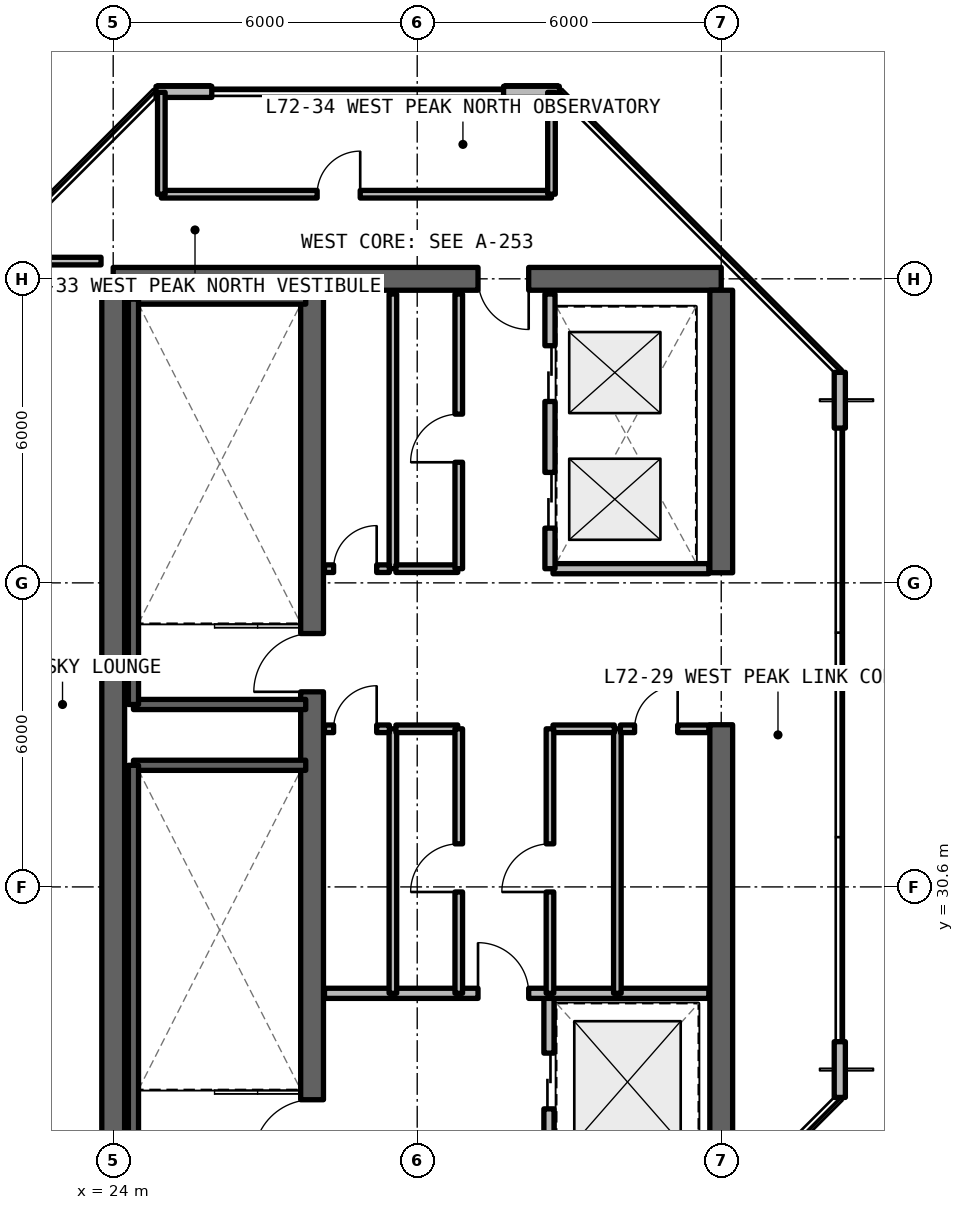
"""IFC4 building model, lengths in metres.
Left out: names, types, materials, properties, quantities, classifications, styles, units other than length and angle.
Written with IfcOpenShell. Run it as: python <this file> out.ifc"""

import sys

from ifc_helpers import new_model, si_unit, direction, frame, frame_2d, origin, place, context, subcontext, project, spatial, rectangle, extrude, element, fill, save


model = new_model("IFC4")
c1 = context("Model", 3, precision=1e-05, world=origin(), true_north=direction((0.0, 1.0)))
c2 = subcontext(c1, "Body", "Model", "MODEL_VIEW")
j1 = project(units=[si_unit("LENGTHUNIT", "METRE"), si_unit("PLANEANGLEUNIT", "RADIAN")], contexts=[c1])
p1 = place(None, origin())
s1 = spatial("IfcSite", under=j1, at=p1, CompositionType="ELEMENT")
p2 = place(p1, origin())
s2 = spatial("IfcBuilding", under=s1, at=p2, CompositionType="ELEMENT")
p3 = place(p2, frame((0.0, 0.0, 257.07)))
s3 = spatial("IfcBuildingStorey", under=s2, at=p3, CompositionType="ELEMENT", Elevation=257.07)
p4 = place(p3, frame((36.0, 42.6, 0.0), z_axis=(0.0, 0.0, 1.0), x_axis=(-1.0, 0.0, 0.0)))
e1 = element("IfcWall", 1, at=p4, inside=s3, PredefinedType="SHEAR", context=c2, shape_type="SweptSolid", body=[
    extrude(rectangle(XDim=12.0, YDim=0.45, at=frame_2d((6.0, 0.0))), origin(), (0.0, 0.0, 1.0), 3.37),
])
p5 = place(p4, frame((3.8, 0.0, 0.0)))
e2 = element("IfcOpeningElement", 2, at=p5, cuts=e1, PredefinedType="OPENING", context=c2, shape_type="SweptSolid", body=[
    extrude(rectangle(XDim=1.0, YDim=2.15, at=frame_2d((0.5, 1.075))), frame((0.0, 0.235, 0.0), z_axis=(0.0, -1.0, 0.0), x_axis=(1.0, 0.0, 0.0)), (0.0, 0.0, 1.0), 0.47),
])
p6 = place(p3, frame((24.0, 24.825, 0.0), z_axis=(0.0, 0.0, 1.0), x_axis=(0.0, 1.0, 0.0)))
e3 = element("IfcWall", 3, at=p6, inside=s3, PredefinedType="SHEAR", context=c2, shape_type="SweptSolid", body=[
    extrude(rectangle(XDim=17.55, YDim=0.45, at=frame_2d((8.775, 0.0))), origin(), (0.0, 0.0, 1.0), 3.37),
])
p7 = place(p3, frame((36.0, 24.825, 0.0), z_axis=(0.0, 0.0, 1.0), x_axis=(0.0, 1.0, 0.0)))
e4 = element("IfcWall", 4, at=p7, inside=s3, PredefinedType="SHEAR", context=c2, shape_type="SweptSolid", body=[
    extrude(rectangle(XDim=8.975, YDim=0.45, at=frame_2d((4.488, 0.0))), origin(), (0.0, 0.0, 1.0), 3.37),
])
p8 = place(p3, frame((36.0, 36.8, 0.0), z_axis=(0.0, 0.0, 1.0), x_axis=(0.0, 1.0, 0.0)))
e5 = element("IfcWall", 5, at=p8, inside=s3, PredefinedType="SHEAR", context=c2, shape_type="SweptSolid", body=[
    extrude(rectangle(XDim=5.575, YDim=0.45, at=frame_2d((2.788, 0.0))), origin(), (0.0, 0.0, 1.0), 3.37),
])
p9 = place(p3, frame((27.925, 24.825, 0.0), z_axis=(0.0, 0.0, 1.0), x_axis=(0.0, 1.0, 0.0)))
e6 = element("IfcWall", 6, at=p9, inside=s3, PredefinedType="SHEAR", context=c2, shape_type="SweptSolid", body=[
    extrude(rectangle(XDim=17.55, YDim=0.45, at=frame_2d((8.775, 0.0))), origin(), (0.0, 0.0, 1.0), 3.37),
])
p10 = place(p9, frame((0.425, 0.0, 0.0)))
e7 = element("IfcOpeningElement", 7, at=p10, cuts=e6, PredefinedType="OPENING", context=c2, shape_type="SweptSolid", body=[
    extrude(rectangle(XDim=1.15, YDim=2.15, at=frame_2d((0.575, 1.075))), frame((0.0, 0.235, 0.0), z_axis=(0.0, -1.0, 0.0), x_axis=(1.0, 0.0, 0.0)), (0.0, 0.0, 1.0), 0.47),
])
p11 = place(p9, frame((9.625, 0.0, 0.0)))
e8 = element("IfcOpeningElement", 8, at=p11, cuts=e6, PredefinedType="OPENING", context=c2, shape_type="SweptSolid", body=[
    extrude(rectangle(XDim=1.15, YDim=2.15, at=frame_2d((0.575, 1.075))), frame((0.0, 0.235, 0.0), z_axis=(0.0, -1.0, 0.0), x_axis=(1.0, 0.0, 0.0)), (0.0, 0.0, 1.0), 0.47),
])
for number, where, z_axis, x_axis in (
    (9, (38.34, 26.446, 0.0), (0.0, 0.0, 1.0), (0.0, 1.0, 0.0)),
    (10, (38.34, 39.654, 0.0), (0.0, 0.0, 1.0), (0.0, 1.0, 0.0)),
    (11, (32.804, 46.29, 0.0), (0.0, 0.0, 1.0), (-1.0, 0.0, 0.0)),
):
    element("IfcWall", number, at=place(p3, frame(where, z_axis=z_axis, x_axis=x_axis)), inside=s3, PredefinedType="SOLIDWALL", context=c2, shape_type="SweptSolid", body=[
        extrude(rectangle(XDim=1.1, YDim=0.22, at=frame_2d((0.55, 0.0))), origin(), (0.0, 0.0, 1.0), 3.41),
    ])
p12 = place(p3, frame((25.946, 46.29, 0.0), z_axis=(0.0, 0.0, 1.0), x_axis=(-1.0, 0.0, 0.0)))
e12 = element("IfcWall", 12, at=p12, inside=s3, PredefinedType="SOLIDWALL", context=c2, shape_type="SweptSolid", body=[
    extrude(rectangle(XDim=1.1, YDim=0.22, at=frame_2d((0.55, 0.0))), origin(), (0.0, 0.0, 1.0), 3.41),
])
p13 = place(p3, frame((32.6, 24.92, 0.0), z_axis=(0.0, 0.0, 1.0), x_axis=(0.0, 1.0, 0.0)))
e13 = element("IfcWall", 13, at=p13, inside=s3, PredefinedType="SOLIDWALL", context=c2, shape_type="SweptSolid", body=[
    extrude(rectangle(XDim=3.58, YDim=0.2, at=frame_2d((1.79, 0.0))), origin(), (0.0, 0.0, 1.0), 2.63),
])
p14 = place(p13, frame((1.3, 0.0, 0.0)))
e14 = element("IfcOpeningElement", 14, at=p14, cuts=e13, PredefinedType="OPENING", context=c2, shape_type="SweptSolid", body=[
    extrude(rectangle(XDim=1.1, YDim=2.2, at=frame_2d((0.55, 1.1))), frame((0.0, 0.11, 0.0), z_axis=(0.0, -1.0, 0.0), x_axis=(1.0, 0.0, 0.0)), (0.0, 0.0, 1.0), 0.22),
])
p15 = place(p3, frame((28.17, 28.5, 0.0), z_axis=(0.0, 0.0, 1.0), x_axis=(1.0, 0.0, 0.0)))
e15 = element("IfcWall", 15, at=p15, inside=s3, PredefinedType="SOLIDWALL", context=c2, shape_type="SweptSolid", body=[
    extrude(rectangle(XDim=7.585, YDim=0.2, at=frame_2d((3.792, 0.0))), origin(), (0.0, 0.0, 1.0), 2.63),
])
p16 = place(p15, frame((3.03, 0.0, 0.0)))
e16 = element("IfcOpeningElement", 16, at=p16, cuts=e15, PredefinedType="OPENING", context=c2, shape_type="SweptSolid", body=[
    extrude(rectangle(XDim=1.0, YDim=2.15, at=frame_2d((0.5, 1.075))), frame((0.0, 0.11, 0.0), z_axis=(0.0, -1.0, 0.0), x_axis=(1.0, 0.0, 0.0)), (0.0, 0.0, 1.0), 0.22),
])
p17 = place(p3, frame((29.52, 28.5, 0.0), z_axis=(0.0, 0.0, 1.0), x_axis=(0.0, 1.0, 0.0)))
e17 = element("IfcWall", 17, at=p17, inside=s3, PredefinedType="SOLIDWALL", context=c2, shape_type="SweptSolid", body=[
    extrude(rectangle(XDim=5.22, YDim=0.15, at=frame_2d((2.61, 0.0))), origin(), (0.0, 0.0, 1.0), 2.63),
])
p18 = place(p3, frame((28.17, 33.72, 0.0), z_axis=(0.0, 0.0, 1.0), x_axis=(1.0, 0.0, 0.0)))
e18 = element("IfcWall", 18, at=p18, inside=s3, PredefinedType="SOLIDWALL", context=c2, shape_type="SweptSolid", body=[
    extrude(rectangle(XDim=1.28, YDim=0.15, at=frame_2d((0.64, 0.0))), origin(), (0.0, 0.0, 1.0), 2.63),
])
p19 = place(p18, frame((0.18, 0.0, 0.0)))
e19 = element("IfcOpeningElement", 19, at=p19, cuts=e18, PredefinedType="OPENING", context=c2, shape_type="SweptSolid", body=[
    extrude(rectangle(XDim=0.85, YDim=2.1, at=frame_2d((0.425, 1.05))), frame((0.0, 0.085, 0.0), z_axis=(0.0, -1.0, 0.0), x_axis=(1.0, 0.0, 0.0)), (0.0, 0.0, 1.0), 0.17),
])
p20 = place(p3, frame((29.58, 33.72, 0.0), z_axis=(0.0, 0.0, 1.0), x_axis=(1.0, 0.0, 0.0)))
e20 = element("IfcWall", 20, at=p20, inside=s3, PredefinedType="SOLIDWALL", context=c2, shape_type="SweptSolid", body=[
    extrude(rectangle(XDim=1.22, YDim=0.15, at=frame_2d((0.61, 0.0))), origin(), (0.0, 0.0, 1.0), 2.63),
])
p21 = place(p3, frame((30.82, 28.5, 0.0), z_axis=(0.0, 0.0, 1.0), x_axis=(0.0, 1.0, 0.0)))
e21 = element("IfcWall", 21, at=p21, inside=s3, PredefinedType="SOLIDWALL", context=c2, shape_type="SweptSolid", body=[
    extrude(rectangle(XDim=5.22, YDim=0.15, at=frame_2d((2.61, 0.0))), origin(), (0.0, 0.0, 1.0), 2.63),
])
p22 = place(p21, frame((2.0, 0.0, 0.0)))
e22 = element("IfcOpeningElement", 22, at=p22, cuts=e21, PredefinedType="OPENING", context=c2, shape_type="SweptSolid", body=[
    extrude(rectangle(XDim=0.95, YDim=2.15, at=frame_2d((0.475, 1.075))), frame((0.0, 0.085, 0.0), z_axis=(0.0, -1.0, 0.0), x_axis=(1.0, 0.0, 0.0)), (0.0, 0.0, 1.0), 0.17),
])
p23 = place(p3, frame((33.95, 28.5, 0.0), z_axis=(0.0, 0.0, 1.0), x_axis=(0.0, 1.0, 0.0)))
e23 = element("IfcWall", 23, at=p23, inside=s3, PredefinedType="SOLIDWALL", context=c2, shape_type="SweptSolid", body=[
    extrude(rectangle(XDim=5.22, YDim=0.15, at=frame_2d((2.61, 0.0))), origin(), (0.0, 0.0, 1.0), 2.63),
])
p24 = place(p3, frame((32.68, 33.72, 0.0), z_axis=(0.0, 0.0, 1.0), x_axis=(1.0, 0.0, 0.0)))
e24 = element("IfcWall", 24, at=p24, inside=s3, PredefinedType="SOLIDWALL", context=c2, shape_type="SweptSolid", body=[
    extrude(rectangle(XDim=1.21, YDim=0.15, at=frame_2d((0.605, 0.0))), origin(), (0.0, 0.0, 1.0), 2.63),
])
p25 = place(p3, frame((34.01, 33.72, 0.0), z_axis=(0.0, 0.0, 1.0), x_axis=(1.0, 0.0, 0.0)))
e25 = element("IfcWall", 25, at=p25, inside=s3, PredefinedType="SOLIDWALL", context=c2, shape_type="SweptSolid", body=[
    extrude(rectangle(XDim=1.745, YDim=0.15, at=frame_2d((0.873, 0.0))), origin(), (0.0, 0.0, 1.0), 2.63),
])
p26 = place(p25, frame((0.28, 0.0, 0.0)))
e26 = element("IfcOpeningElement", 26, at=p26, cuts=e25, PredefinedType="OPENING", context=c2, shape_type="SweptSolid", body=[
    extrude(rectangle(XDim=0.85, YDim=2.1, at=frame_2d((0.425, 1.05))), frame((0.0, 0.085, 0.0), z_axis=(0.0, -1.0, 0.0), x_axis=(1.0, 0.0, 0.0)), (0.0, 0.0, 1.0), 0.17),
])
p27 = place(p3, frame((32.62, 28.5, 0.0), z_axis=(0.0, 0.0, 1.0), x_axis=(0.0, 1.0, 0.0)))
e27 = element("IfcWall", 27, at=p27, inside=s3, PredefinedType="SOLIDWALL", context=c2, shape_type="SweptSolid", body=[
    extrude(rectangle(XDim=5.22, YDim=0.15, at=frame_2d((2.61, 0.0))), origin(), (0.0, 0.0, 1.0), 2.63),
])
p28 = place(p27, frame((2.0, 0.0, 0.0)))
e28 = element("IfcOpeningElement", 28, at=p28, cuts=e27, PredefinedType="OPENING", context=c2, shape_type="SweptSolid", body=[
    extrude(rectangle(XDim=0.95, YDim=2.15, at=frame_2d((0.475, 1.075))), frame((0.0, 0.085, 0.0), z_axis=(0.0, -1.0, 0.0), x_axis=(1.0, 0.0, 0.0)), (0.0, 0.0, 1.0), 0.17),
])
p29 = place(p3, frame((29.52, 36.88, 0.0), z_axis=(0.0, 0.0, 1.0), x_axis=(0.0, 1.0, 0.0)))
e29 = element("IfcWall", 29, at=p29, inside=s3, PredefinedType="SOLIDWALL", context=c2, shape_type="SweptSolid", body=[
    extrude(rectangle(XDim=5.42, YDim=0.15, at=frame_2d((2.71, 0.0))), origin(), (0.0, 0.0, 1.0), 2.63),
])
p30 = place(p3, frame((28.17, 36.88, 0.0), z_axis=(0.0, 0.0, 1.0), x_axis=(1.0, 0.0, 0.0)))
e30 = element("IfcWall", 30, at=p30, inside=s3, PredefinedType="SOLIDWALL", context=c2, shape_type="SweptSolid", body=[
    extrude(rectangle(XDim=1.28, YDim=0.15, at=frame_2d((0.64, 0.0))), origin(), (0.0, 0.0, 1.0), 2.63),
])
p31 = place(p30, frame((0.18, 0.0, 0.0)))
e31 = element("IfcOpeningElement", 31, at=p31, cuts=e30, PredefinedType="OPENING", context=c2, shape_type="SweptSolid", body=[
    extrude(rectangle(XDim=0.85, YDim=2.1, at=frame_2d((0.425, 1.05))), frame((0.0, 0.085, 0.0), z_axis=(0.0, -1.0, 0.0), x_axis=(1.0, 0.0, 0.0)), (0.0, 0.0, 1.0), 0.17),
])
p32 = place(p3, frame((29.58, 36.88, 0.0), z_axis=(0.0, 0.0, 1.0), x_axis=(1.0, 0.0, 0.0)))
e32 = element("IfcWall", 32, at=p32, inside=s3, PredefinedType="SOLIDWALL", context=c2, shape_type="SweptSolid", body=[
    extrude(rectangle(XDim=1.22, YDim=0.15, at=frame_2d((0.61, 0.0))), origin(), (0.0, 0.0, 1.0), 2.63),
])
p33 = place(p3, frame((30.82, 36.88, 0.0), z_axis=(0.0, 0.0, 1.0), x_axis=(0.0, 1.0, 0.0)))
e33 = element("IfcWall", 33, at=p33, inside=s3, PredefinedType="SOLIDWALL", context=c2, shape_type="SweptSolid", body=[
    extrude(rectangle(XDim=5.42, YDim=0.15, at=frame_2d((2.71, 0.0))), origin(), (0.0, 0.0, 1.0), 2.63),
])
p34 = place(p33, frame((2.1, 0.0, 0.0)))
e34 = element("IfcOpeningElement", 34, at=p34, cuts=e33, PredefinedType="OPENING", context=c2, shape_type="SweptSolid", body=[
    extrude(rectangle(XDim=0.95, YDim=2.15, at=frame_2d((0.475, 1.075))), frame((0.0, 0.085, 0.0), z_axis=(0.0, -1.0, 0.0), x_axis=(1.0, 0.0, 0.0)), (0.0, 0.0, 1.0), 0.17),
])
p35 = place(p3, frame((32.68, 36.88, 0.0), z_axis=(0.0, 0.0, 1.0), x_axis=(1.0, 0.0, 0.0)))
e35 = element("IfcWall", 35, at=p35, inside=s3, PredefinedType="SOLIDWALL", context=c2, shape_type="SweptSolid", body=[
    extrude(rectangle(XDim=3.075, YDim=0.2, at=frame_2d((1.538, 0.0))), origin(), (0.0, 0.0, 1.0), 2.63),
])
p36 = place(p3, frame((32.62, 36.88, 0.0), z_axis=(0.0, 0.0, 1.0), x_axis=(0.0, 1.0, 0.0)))
e36 = element("IfcWall", 36, at=p36, inside=s3, PredefinedType="SOLIDWALL", context=c2, shape_type="SweptSolid", body=[
    extrude(rectangle(XDim=5.42, YDim=0.2, at=frame_2d((2.71, 0.0))), origin(), (0.0, 0.0, 1.0), 2.63),
])
p37 = place(p36, frame((0.8, 0.0, 0.0)))
e37 = element("IfcOpeningElement", 37, at=p37, cuts=e36, PredefinedType="OPENING", context=c2, shape_type="SweptSolid", body=[
    extrude(rectangle(XDim=1.1, YDim=2.2, at=frame_2d((0.55, 1.1))), frame((0.0, 0.11, 0.0), z_axis=(0.0, -1.0, 0.0), x_axis=(1.0, 0.0, 0.0)), (0.0, 0.0, 1.0), 0.22),
])
p38 = place(p36, frame((3.3, 0.0, 0.0)))
e38 = element("IfcOpeningElement", 38, at=p38, cuts=e36, PredefinedType="OPENING", context=c2, shape_type="SweptSolid", body=[
    extrude(rectangle(XDim=1.1, YDim=2.2, at=frame_2d((0.55, 1.1))), frame((0.0, 0.11, 0.0), z_axis=(0.0, -1.0, 0.0), x_axis=(1.0, 0.0, 0.0)), (0.0, 0.0, 1.0), 0.22),
])
p39 = place(p3, frame((22.12, 42.95, 0.0), z_axis=(0.0, 0.0, 1.0), x_axis=(1.0, 0.0, 0.0)))
e39 = element("IfcWall", 39, at=p39, inside=s3, PredefinedType="SOLIDWALL", context=c2, shape_type="SweptSolid", body=[
    extrude(rectangle(XDim=1.64, YDim=0.15, at=frame_2d((0.82, 0.0))), origin(), (0.0, 0.0, 1.0), 2.63),
])
p40 = place(p3, frame((24.95, 44.27, 0.0), z_axis=(0.0, 0.0, 1.0), x_axis=(1.0, 0.0, 0.0)))
e40 = element("IfcWall", 40, at=p40, inside=s3, PredefinedType="SOLIDWALL", context=c2, shape_type="SweptSolid", body=[
    extrude(rectangle(XDim=7.7, YDim=0.15, at=frame_2d((3.85, 0.0))), origin(), (0.0, 0.0, 1.0), 2.63),
])
p41 = place(p40, frame((3.075, 0.0, 0.0)))
e41 = element("IfcOpeningElement", 41, at=p41, cuts=e40, PredefinedType="OPENING", context=c2, shape_type="SweptSolid", body=[
    extrude(rectangle(XDim=0.85, YDim=2.1, at=frame_2d((0.425, 1.05))), frame((0.0, 0.085, 0.0), z_axis=(0.0, -1.0, 0.0), x_axis=(1.0, 0.0, 0.0)), (0.0, 0.0, 1.0), 0.17),
])
for number, where, z_axis, x_axis in (
    (42, (24.95, 44.27, 0.0), (0.0, 0.0, 1.0), (0.0, 1.0, 0.0)),
    (43, (32.65, 44.27, 0.0), (0.0, 0.0, 1.0), (0.0, 1.0, 0.0)),
):
    element("IfcWall", number, at=place(p3, frame(where, z_axis=z_axis, x_axis=x_axis)), inside=s3, PredefinedType="SOLIDWALL", context=c2, shape_type="SweptSolid", body=[
        extrude(rectangle(XDim=2.01, YDim=0.15, at=frame_2d((1.005, 0.0))), origin(), (0.0, 0.0, 1.0), 2.63),
    ])
p42 = place(p3, frame((27.8, 33.0, 0.0), z_axis=(0.0, 0.0, 1.0), x_axis=(-1.0, 0.0, 0.0)))
e44 = element("IfcWall", 44, at=p42, inside=s3, PredefinedType="SOLIDWALL", context=c2, shape_type="SweptSolid", body=[
    extrude(rectangle(XDim=3.4, YDim=0.2, at=frame_2d((1.7, 0.0))), origin(), (0.0, 0.0, 1.0), 3.63),
])
p43 = place(p3, frame((24.4, 33.0, 0.0), z_axis=(0.0, 0.0, 1.0), x_axis=(0.0, -1.0, 0.0)))
e45 = element("IfcWall", 45, at=p43, inside=s3, PredefinedType="SOLIDWALL", context=c2, shape_type="SweptSolid", body=[
    extrude(rectangle(XDim=8.0, YDim=0.2, at=frame_2d((4.0, 0.0))), origin(), (0.0, 0.0, 1.0), 3.63),
])
for number, where, z_axis, x_axis in (
    (46, (24.4, 34.2, 0.0), (0.0, 0.0, 1.0), (1.0, 0.0, 0.0)),
    (47, (27.8, 42.2, 0.0), (0.0, 0.0, 1.0), (-1.0, 0.0, 0.0)),
):
    element("IfcWall", number, at=place(p3, frame(where, z_axis=z_axis, x_axis=x_axis)), inside=s3, PredefinedType="SOLIDWALL", context=c2, shape_type="SweptSolid", body=[
        extrude(rectangle(XDim=3.4, YDim=0.2, at=frame_2d((1.7, 0.0))), origin(), (0.0, 0.0, 1.0), 3.63),
    ])
p44 = place(p3, frame((24.4, 42.2, 0.0), z_axis=(0.0, 0.0, 1.0), x_axis=(0.0, -1.0, 0.0)))
e48 = element("IfcWall", 48, at=p44, inside=s3, PredefinedType="SOLIDWALL", context=c2, shape_type="SweptSolid", body=[
    extrude(rectangle(XDim=8.0, YDim=0.2, at=frame_2d((4.0, 0.0))), origin(), (0.0, 0.0, 1.0), 3.63),
])
p45 = place(p14, origin())
e49 = element("IfcDoor", 49, at=p45, inside=s3, OperationType="SLIDING_TO_LEFT", PredefinedType="DOOR", context=c2, shape_type="SweptSolid", body=[
    extrude(rectangle(XDim=1.1, YDim=2.2, at=frame_2d((0.55, 1.1))), frame((0.0, 0.025, 0.0), z_axis=(0.0, -1.0, 0.0), x_axis=(1.0, 0.0, 0.0)), (0.0, 0.0, 1.0), 0.05),
])
fill(e14, e49)
p46 = place(p16, origin())
e50 = element("IfcDoor", 50, at=p46, inside=s3, OperationType="SINGLE_SWING_LEFT", PredefinedType="DOOR", context=c2, shape_type="SweptSolid", body=[
    extrude(rectangle(XDim=1.0, YDim=2.15, at=frame_2d((0.5, 1.075))), frame((0.0, 0.025, 0.0), z_axis=(0.0, -1.0, 0.0), x_axis=(1.0, 0.0, 0.0)), (0.0, 0.0, 1.0), 0.05),
])
fill(e16, e50)
p47 = place(p19, origin())
e51 = element("IfcDoor", 51, at=p47, inside=s3, OperationType="SINGLE_SWING_RIGHT", PredefinedType="DOOR", context=c2, shape_type="SweptSolid", body=[
    extrude(rectangle(XDim=0.85, YDim=2.1, at=frame_2d((0.425, 1.05))), frame((0.0, 0.025, 0.0), z_axis=(0.0, -1.0, 0.0), x_axis=(1.0, 0.0, 0.0)), (0.0, 0.0, 1.0), 0.05),
])
fill(e19, e51)
p48 = place(p22, origin())
e52 = element("IfcDoor", 52, at=p48, inside=s3, OperationType="SINGLE_SWING_LEFT", PredefinedType="DOOR", context=c2, shape_type="SweptSolid", body=[
    extrude(rectangle(XDim=0.95, YDim=2.15, at=frame_2d((0.475, 1.075))), frame((0.0, 0.025, 0.0), z_axis=(0.0, -1.0, 0.0), x_axis=(1.0, 0.0, 0.0)), (0.0, 0.0, 1.0), 0.05),
])
fill(e22, e52)
p49 = place(p26, origin())
e53 = element("IfcDoor", 53, at=p49, inside=s3, OperationType="SINGLE_SWING_RIGHT", PredefinedType="DOOR", context=c2, shape_type="SweptSolid", body=[
    extrude(rectangle(XDim=0.85, YDim=2.1, at=frame_2d((0.425, 1.05))), frame((0.0, 0.025, 0.0), z_axis=(0.0, -1.0, 0.0), x_axis=(1.0, 0.0, 0.0)), (0.0, 0.0, 1.0), 0.05),
])
fill(e26, e53)
p50 = place(p28, origin())
e54 = element("IfcDoor", 54, at=p50, inside=s3, OperationType="SINGLE_SWING_LEFT", PredefinedType="DOOR", context=c2, shape_type="SweptSolid", body=[
    extrude(rectangle(XDim=0.95, YDim=2.15, at=frame_2d((0.475, 1.075))), frame((0.0, 0.025, 0.0), z_axis=(0.0, -1.0, 0.0), x_axis=(1.0, 0.0, 0.0)), (0.0, 0.0, 1.0), 0.05),
])
fill(e28, e54)
p51 = place(p31, origin())
e55 = element("IfcDoor", 55, at=p51, inside=s3, OperationType="SINGLE_SWING_RIGHT", PredefinedType="DOOR", context=c2, shape_type="SweptSolid", body=[
    extrude(rectangle(XDim=0.85, YDim=2.1, at=frame_2d((0.425, 1.05))), frame((0.0, 0.025, 0.0), z_axis=(0.0, -1.0, 0.0), x_axis=(1.0, 0.0, 0.0)), (0.0, 0.0, 1.0), 0.05),
])
fill(e31, e55)
p52 = place(p34, origin())
e56 = element("IfcDoor", 56, at=p52, inside=s3, OperationType="SINGLE_SWING_LEFT", PredefinedType="DOOR", context=c2, shape_type="SweptSolid", body=[
    extrude(rectangle(XDim=0.95, YDim=2.15, at=frame_2d((0.475, 1.075))), frame((0.0, 0.025, 0.0), z_axis=(0.0, -1.0, 0.0), x_axis=(1.0, 0.0, 0.0)), (0.0, 0.0, 1.0), 0.05),
])
fill(e34, e56)
p53 = place(p37, origin())
e57 = element("IfcDoor", 57, at=p53, inside=s3, OperationType="SLIDING_TO_LEFT", PredefinedType="DOOR", context=c2, shape_type="SweptSolid", body=[
    extrude(rectangle(XDim=1.1, YDim=2.2, at=frame_2d((0.55, 1.1))), frame((0.0, 0.025, 0.0), z_axis=(0.0, -1.0, 0.0), x_axis=(1.0, 0.0, 0.0)), (0.0, 0.0, 1.0), 0.05),
])
fill(e37, e57)
p54 = place(p38, origin())
e58 = element("IfcDoor", 58, at=p54, inside=s3, OperationType="SLIDING_TO_RIGHT", PredefinedType="DOOR", context=c2, shape_type="SweptSolid", body=[
    extrude(rectangle(XDim=1.1, YDim=2.2, at=frame_2d((0.55, 1.1))), frame((0.0, 0.025, 0.0), z_axis=(0.0, -1.0, 0.0), x_axis=(1.0, 0.0, 0.0)), (0.0, 0.0, 1.0), 0.05),
])
fill(e38, e58)
p55 = place(p41, origin())
e59 = element("IfcDoor", 59, at=p55, inside=s3, OperationType="SINGLE_SWING_RIGHT", PredefinedType="DOOR", context=c2, shape_type="SweptSolid", body=[
    extrude(rectangle(XDim=0.85, YDim=2.1, at=frame_2d((0.425, 1.05))), frame((0.0, 0.025, 0.0), z_axis=(0.0, -1.0, 0.0), x_axis=(1.0, 0.0, 0.0)), (0.0, 0.0, 1.0), 0.05),
])
fill(e41, e59)
p56 = place(p10, origin())
e60 = element("IfcDoor", 60, at=p56, inside=s3, OperationType="SINGLE_SWING_LEFT", PredefinedType="DOOR", context=c2, shape_type="SweptSolid", body=[
    extrude(rectangle(XDim=1.15, YDim=2.15, at=frame_2d((0.575, 1.075))), frame((0.0, 0.025, 0.0), z_axis=(0.0, -1.0, 0.0), x_axis=(1.0, 0.0, 0.0)), (0.0, 0.0, 1.0), 0.05),
])
fill(e7, e60)
p57 = place(p11, origin())
e61 = element("IfcDoor", 61, at=p57, inside=s3, OperationType="SINGLE_SWING_RIGHT", PredefinedType="DOOR", context=c2, shape_type="SweptSolid", body=[
    extrude(rectangle(XDim=1.15, YDim=2.15, at=frame_2d((0.575, 1.075))), frame((0.0, 0.025, 0.0), z_axis=(0.0, -1.0, 0.0), x_axis=(1.0, 0.0, 0.0)), (0.0, 0.0, 1.0), 0.05),
])
fill(e8, e61)
p58 = place(p5, origin())
e62 = element("IfcDoor", 62, at=p58, inside=s3, OperationType="SINGLE_SWING_RIGHT", PredefinedType="DOOR", context=c2, shape_type="SweptSolid", body=[
    extrude(rectangle(XDim=1.0, YDim=2.15, at=frame_2d((0.5, 1.075))), frame((0.0, 0.025, 0.0), z_axis=(0.0, -1.0, 0.0), x_axis=(1.0, 0.0, 0.0)), (0.0, 0.0, 1.0), 0.05),
])
fill(e2, e62)
save(model, sys.argv[1])
